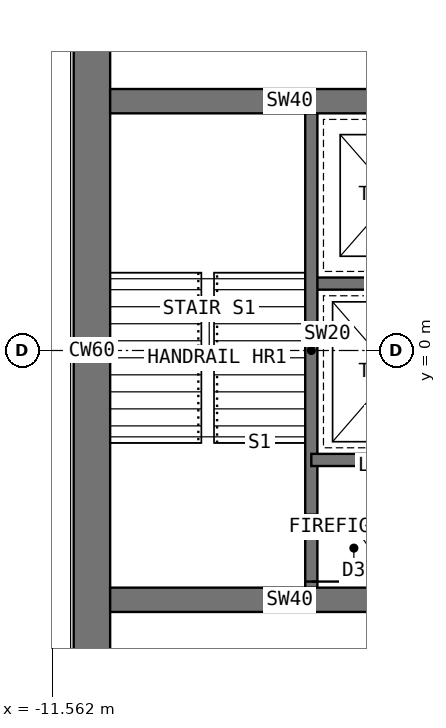
"""IFC4 building model, lengths in metres.
Left out: names, types, materials, properties, quantities, classifications, styles, units other than length and angle.
Written with IfcOpenShell. Run it as: python <this file> out.ifc"""

import sys

from ifc_helpers import new_model, si_unit, direction, frame, frame_2d, origin, place, context, subcontext, project, spatial, rectangle, extrude, element, fill, save


model = new_model("IFC4")
c1 = context("Model", 3, precision=1e-05, world=origin(), true_north=direction((0.0, 1.0)))
c2 = subcontext(c1, "Body", "Model", "MODEL_VIEW")
j1 = project(units=[si_unit("LENGTHUNIT", "METRE"), si_unit("PLANEANGLEUNIT", "RADIAN")], contexts=[c1])
p1 = place(None, origin())
s1 = spatial("IfcSite", under=j1, at=p1, CompositionType="ELEMENT")
p2 = place(p1, origin())
s2 = spatial("IfcBuilding", under=s1, at=p2, CompositionType="ELEMENT")
p3 = place(p2, frame((0.0, 0.0, 121.5)))
s3 = spatial("IfcBuildingStorey", under=s2, at=p3, CompositionType="ELEMENT", Elevation=121.5)
p4 = place(p3, frame((-10.908, 6.298, 0.0), z_axis=(0.0, 0.0, 1.0), x_axis=(0.0, -1.0, 0.0)))
e1 = element("IfcWall", 1, at=p4, inside=s3, PredefinedType="SHEAR", context=c2, shape_type="SweptSolid", body=[
    extrude(rectangle(XDim=12.596, YDim=0.6, at=frame_2d((6.298, 0.0))), origin(), (0.0, 0.0, 1.0), 4.0),
])
p5 = place(p3, frame((-4.7, 1.1, 0.0), z_axis=(0.0, 0.0, 1.0), x_axis=(-1.0, 0.0, 0.0)))
e2 = element("IfcWall", 2, at=p5, inside=s3, PredefinedType="SHEAR", context=c2, shape_type="SweptSolid", body=[
    extrude(rectangle(XDim=2.6, YDim=0.2, at=frame_2d((1.3, 0.0))), origin(), (0.0, 0.0, 1.0), 4.0),
])
p6 = place(p3, frame((-4.7, -1.8, 0.0), z_axis=(0.0, 0.0, 1.0), x_axis=(-1.0, 0.0, 0.0)))
e3 = element("IfcWall", 3, at=p6, inside=s3, PredefinedType="SHEAR", context=c2, shape_type="SweptSolid", body=[
    extrude(rectangle(XDim=2.6, YDim=0.2, at=frame_2d((1.3, 0.0))), origin(), (0.0, 0.0, 1.0), 4.0),
])
p7 = place(p6, frame((0.55, 0.0, 0.0)))
e4 = element("IfcOpeningElement", 4, at=p7, cuts=e3, PredefinedType="OPENING", context=c2, shape_type="SweptSolid", body=[
    extrude(rectangle(XDim=1.3, YDim=2.2, at=frame_2d((0.65, 1.1))), frame((0.0, 0.11, 0.0), z_axis=(0.0, -1.0, 0.0), x_axis=(1.0, 0.0, 0.0)), (0.0, 0.0, 1.0), 0.22),
])
p8 = place(p3, frame((-7.3, 4.0, 0.0), z_axis=(0.0, 0.0, 1.0), x_axis=(0.0, -1.0, 0.0)))
e5 = element("IfcWall", 5, at=p8, inside=s3, PredefinedType="SHEAR", context=c2, shape_type="SweptSolid", body=[
    extrude(rectangle(XDim=8.0, YDim=0.2, at=frame_2d((4.0, 0.0))), origin(), (0.0, 0.0, 1.0), 4.0),
])
p9 = place(p8, frame((6.7, 0.0, 0.0)))
e6 = element("IfcOpeningElement", 6, at=p9, cuts=e5, PredefinedType="OPENING", context=c2, shape_type="SweptSolid", body=[
    extrude(rectangle(XDim=1.1, YDim=2.1, at=frame_2d((0.55, 1.05))), frame((0.0, 0.11, 0.0), z_axis=(0.0, -1.0, 0.0), x_axis=(1.0, 0.0, 0.0)), (0.0, 0.0, 1.0), 0.22),
])
for number, where, z_axis, x_axis in (
    (7, (-4.7, -4.1, 0.0), (0.0, 0.0, 1.0), (-1.0, 0.0, 0.0)),
    (8, (-4.7, 4.1, 0.0), (0.0, 0.0, 1.0), (-1.0, 0.0, 0.0)),
):
    element("IfcWall", number, at=place(p3, frame(where, z_axis=z_axis, x_axis=x_axis)), inside=s3, PredefinedType="SHEAR", context=c2, shape_type="SweptSolid", body=[
        extrude(rectangle(XDim=5.908, YDim=0.4, at=frame_2d((2.954, 0.0))), origin(), (0.0, 0.0, 1.0), 4.0),
    ])
p10 = place(p3, frame((-6.695, -8.396, 0.0), z_axis=(0.0, 0.0, 1.0), x_axis=(0.500009315796, 0.86602002524, 0.0)))
e9 = element("IfcWall", 9, at=p10, inside=s3, PredefinedType="PARTITIONING", context=c2, shape_type="SweptSolid", body=[
    extrude(rectangle(XDim=4.519, YDim=0.15, at=frame_2d((2.259, 0.0))), origin(), (0.0, 0.0, 1.0), 3.8),
])
p11 = place(p10, frame((1.749, 0.0, 0.0)))
e10 = element("IfcOpeningElement", 10, at=p11, cuts=e9, PredefinedType="OPENING", context=c2, shape_type="SweptSolid", body=[
    extrude(rectangle(XDim=1.0, YDim=2.1, at=frame_2d((0.5, 1.05))), frame((0.0, 0.085, 0.0), z_axis=(0.0, -1.0, 0.0), x_axis=(1.0, 0.0, 0.0)), (0.0, 0.0, 1.0), 0.17),
])
p12 = place(p3, frame((-4.436, 4.483, 0.0), z_axis=(0.0, 0.0, 1.0), x_axis=(-0.500009315796, 0.86602002524, 0.0)))
e11 = element("IfcWall", 11, at=p12, inside=s3, PredefinedType="PARTITIONING", context=c2, shape_type="SweptSolid", body=[
    extrude(rectangle(XDim=4.519, YDim=0.15, at=frame_2d((2.259, 0.0))), origin(), (0.0, 0.0, 1.0), 3.8),
])
p13 = place(p12, frame((1.769, 0.0, 0.0)))
e12 = element("IfcOpeningElement", 12, at=p13, cuts=e11, PredefinedType="OPENING", context=c2, shape_type="SweptSolid", body=[
    extrude(rectangle(XDim=1.0, YDim=2.1, at=frame_2d((0.5, 1.05))), frame((0.0, 0.085, 0.0), z_axis=(0.0, -1.0, 0.0), x_axis=(1.0, 0.0, 0.0)), (0.0, 0.0, 1.0), 0.17),
])
p14 = place(p7, origin())
e13 = element("IfcDoor", 13, at=p14, inside=s3, OperationType="DOUBLE_DOOR_SLIDING", PredefinedType="DOOR", context=c2, shape_type="SweptSolid", body=[
    extrude(rectangle(XDim=1.3, YDim=2.2, at=frame_2d((0.65, 1.1))), frame((0.0, 0.025, 0.0), z_axis=(0.0, -1.0, 0.0), x_axis=(1.0, 0.0, 0.0)), (0.0, 0.0, 1.0), 0.05),
])
fill(e4, e13)
p15 = place(p9, origin())
e14 = element("IfcDoor", 14, at=p15, inside=s3, OperationType="SINGLE_SWING_RIGHT", PredefinedType="DOOR", context=c2, shape_type="SweptSolid", body=[
    extrude(rectangle(XDim=1.1, YDim=2.1, at=frame_2d((0.55, 1.05))), frame((0.0, 0.025, 0.0), z_axis=(0.0, -1.0, 0.0), x_axis=(1.0, 0.0, 0.0)), (0.0, 0.0, 1.0), 0.05),
])
fill(e6, e14)
save(model, sys.argv[1])
